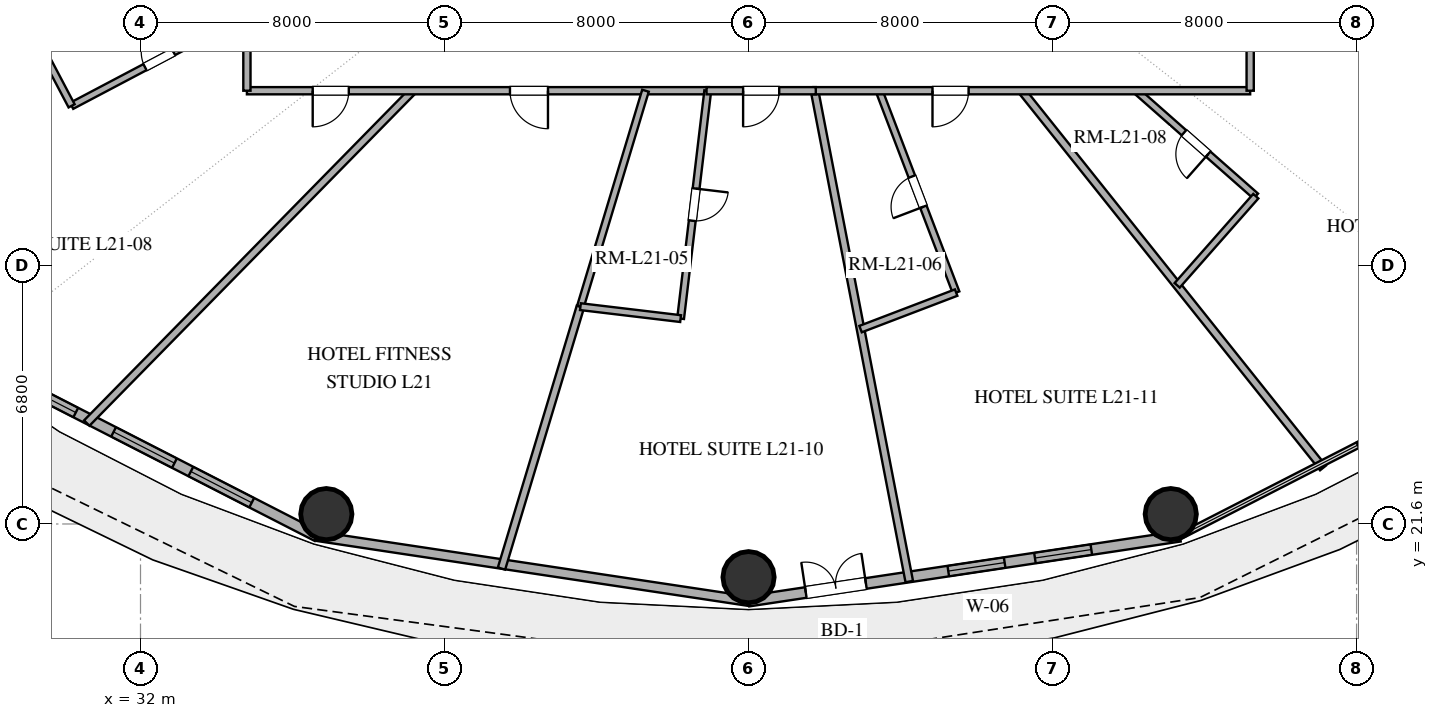
"""IFC4 building model, lengths in metres.
Left out: names, types, materials, properties, quantities, classifications, styles, units other than length and angle.
Written with IfcOpenShell. Run it as: python <this file> out.ifc"""

import sys

from ifc_helpers import new_model, si_unit, direction, frame, frame_2d, origin, origin_2d, place, context, subcontext, project, spatial, rectangle, hollow_circle, extrude, element, fill, save


model = new_model("IFC4")
c1 = context("Model", 3, precision=1e-05, world=origin(), true_north=direction((0.0, 1.0)))
c2 = subcontext(c1, "Body", "Model", "MODEL_VIEW")
j1 = project(units=[si_unit("LENGTHUNIT", "METRE"), si_unit("PLANEANGLEUNIT", "RADIAN")], contexts=[c1])
p1 = place(None, origin())
s1 = spatial("IfcSite", under=j1, at=p1, CompositionType="ELEMENT")
p2 = place(p1, origin())
s2 = spatial("IfcBuilding", under=s1, at=p2, CompositionType="ELEMENT")
p3 = place(p2, frame((0.0, 0.0, 87.6)))
s3 = spatial("IfcBuildingStorey", under=s2, at=p3, CompositionType="ELEMENT", Elevation=87.6)
for number, where, z_axis, x_axis in (
    (1, (36.89, 21.859, 0.0), (0.0, 0.0, 1.0), (1.0, 0.0, 0.0)),
    (2, (48.0, 20.2, 0.0), (0.0, 0.0, 1.0), (1.0, 0.0, 0.0)),
    (3, (59.11, 21.859, 0.0), (0.0, 0.0, 1.0), (1.0, 0.0, 0.0)),
):
    element("IfcColumn", number, at=place(p3, frame(where, z_axis=z_axis, x_axis=x_axis)), inside=s3, PredefinedType="COLUMN", context=c2, shape_type="SweptSolid", body=[
        extrude(hollow_circle(Radius=0.675, WallThickness=0.036, at=origin_2d()), origin(), (0.0, 0.0, 1.0), 3.38),
    ])
p4 = place(p3, frame((27.16, 26.14, 0.0), z_axis=(0.0, 0.0, 1.0), x_axis=(0.889959505023, -0.45603955905, 0.0)))
e4 = element("IfcWall", 4, at=p4, inside=s3, PredefinedType="SOLIDWALL", context=c2, shape_type="SweptSolid", body=[
    extrude(rectangle(XDim=10.662, YDim=0.28, at=frame_2d((5.331, 0.0))), origin(), (0.0, 0.0, 1.0), 3.38),
])
p5 = place(p4, frame((1.724, 0.0, 0.85)))
e5 = element("IfcOpeningElement", 5, at=p5, cuts=e4, PredefinedType="OPENING", context=c2, shape_type="SweptSolid", body=[
    extrude(rectangle(XDim=1.8, YDim=2.2, at=frame_2d((0.9, 1.1))), frame((0.0, 0.15, 0.0), z_axis=(0.0, -1.0, 0.0), x_axis=(1.0, 0.0, 0.0)), (0.0, 0.0, 1.0), 0.3),
])
p6 = place(p4, frame((4.642, 0.0, 0.85)))
e6 = element("IfcOpeningElement", 6, at=p6, cuts=e4, PredefinedType="OPENING", context=c2, shape_type="SweptSolid", body=[
    extrude(rectangle(XDim=1.8, YDim=2.2, at=frame_2d((0.9, 1.1))), frame((0.0, 0.15, 0.0), z_axis=(0.0, -1.0, 0.0), x_axis=(1.0, 0.0, 0.0)), (0.0, 0.0, 1.0), 0.3),
])
p7 = place(p4, frame((6.927, 0.0, 0.85)))
e7 = element("IfcOpeningElement", 7, at=p7, cuts=e4, PredefinedType="OPENING", context=c2, shape_type="SweptSolid", body=[
    extrude(rectangle(XDim=1.8, YDim=2.2, at=frame_2d((0.9, 1.1))), frame((0.0, 0.15, 0.0), z_axis=(0.0, -1.0, 0.0), x_axis=(1.0, 0.0, 0.0)), (0.0, 0.0, 1.0), 0.3),
])
p8 = place(p3, frame((36.649, 21.277, 0.0), z_axis=(0.0, 0.0, 1.0), x_axis=(0.988877774656, -0.148730450117, 0.0)))
e8 = element("IfcWall", 8, at=p8, inside=s3, PredefinedType="SOLIDWALL", context=c2, shape_type="SweptSolid", body=[
    extrude(rectangle(XDim=11.479, YDim=0.25, at=frame_2d((5.74, 0.0))), origin(), (0.0, 0.0, 1.0), 3.38),
])
p9 = place(p3, frame((48.0, 19.57, 0.0), z_axis=(0.0, 0.0, 1.0), x_axis=(0.988877774656, 0.148730450117, 0.0)))
e9 = element("IfcWall", 9, at=p9, inside=s3, PredefinedType="SOLIDWALL", context=c2, shape_type="SweptSolid", body=[
    extrude(rectangle(XDim=11.479, YDim=0.28, at=frame_2d((5.74, 0.0))), origin(), (0.0, 0.0, 1.0), 3.38),
])
p10 = place(p9, frame((1.524, 0.0, 0.0)))
e10 = element("IfcOpeningElement", 10, at=p10, cuts=e9, PredefinedType="OPENING", context=c2, shape_type="SweptSolid", body=[
    extrude(rectangle(XDim=1.6, YDim=2.25, at=frame_2d((0.8, 1.125))), frame((0.0, 0.15, 0.0), z_axis=(0.0, -1.0, 0.0), x_axis=(1.0, 0.0, 0.0)), (0.0, 0.0, 1.0), 0.3),
])
p11 = place(p9, frame((5.315, 0.0, 0.85)))
e11 = element("IfcOpeningElement", 11, at=p11, cuts=e9, PredefinedType="OPENING", context=c2, shape_type="SweptSolid", body=[
    extrude(rectangle(XDim=1.5, YDim=2.0, at=frame_2d((0.75, 1.0))), frame((0.0, 0.15, 0.0), z_axis=(0.0, -1.0, 0.0), x_axis=(1.0, 0.0, 0.0)), (0.0, 0.0, 1.0), 0.3),
])
p12 = place(p9, frame((7.621, 0.0, 0.85)))
e12 = element("IfcOpeningElement", 12, at=p12, cuts=e9, PredefinedType="OPENING", context=c2, shape_type="SweptSolid", body=[
    extrude(rectangle(XDim=1.5, YDim=2.0, at=frame_2d((0.75, 1.0))), frame((0.0, 0.15, 0.0), z_axis=(0.0, -1.0, 0.0), x_axis=(1.0, 0.0, 0.0)), (0.0, 0.0, 1.0), 0.3),
])
p13 = place(p3, frame((39.167, 33.0, 0.0), z_axis=(0.0, 0.0, 1.0), x_axis=(-0.700440086719, -0.713711205542, 0.0)))
e13 = element("IfcWall", 13, at=p13, inside=s3, PredefinedType="PARTITIONING", context=c2, shape_type="SweptSolid", body=[
    extrude(rectangle(XDim=12.252, YDim=0.2, at=frame_2d((6.126, 0.0))), origin(), (0.0, 0.0, 1.0), 2.74),
])
p14 = place(p3, frame((34.8, 37.75, 0.0), z_axis=(0.0, 0.0, 1.0), x_axis=(-0.951880556228, -0.306469258939, 0.0)))
e14 = element("IfcWall", 14, at=p14, inside=s3, PredefinedType="PARTITIONING", context=c2, shape_type="SweptSolid", body=[
    extrude(rectangle(XDim=14.428, YDim=0.2, at=frame_2d((7.214, 0.0))), origin(), (0.0, 0.0, 1.0), 2.74),
])
p15 = place(p3, frame((41.5, 20.427, 0.0), z_axis=(0.0, 0.0, 1.0), x_axis=(0.288514746458, 0.957475451944, 0.0)))
e15 = element("IfcWall", 15, at=p15, inside=s3, PredefinedType="PARTITIONING", context=c2, shape_type="SweptSolid", body=[
    extrude(rectangle(XDim=7.197, YDim=0.2, at=frame_2d((3.599, 0.0))), origin(), (0.0, 0.0, 1.0), 2.74),
])
p16 = place(p3, frame((49.737, 33.0, 0.0), z_axis=(0.0, 0.0, 1.0), x_axis=(0.18949034594, -0.981882584017, 0.0)))
e16 = element("IfcWall", 16, at=p16, inside=s3, PredefinedType="PARTITIONING", context=c2, shape_type="SweptSolid", body=[
    extrude(rectangle(XDim=13.153, YDim=0.2, at=frame_2d((6.577, 0.0))), origin(), (0.0, 0.0, 1.0), 2.74),
])
p17 = place(p3, frame((61.2, 36.208, 0.0), z_axis=(0.0, 0.0, 1.0), x_axis=(0.915722078144, -0.401812239235, 0.0)))
e17 = element("IfcWall", 17, at=p17, inside=s3, PredefinedType="PARTITIONING", context=c2, shape_type="SweptSolid", body=[
    extrude(rectangle(XDim=12.915, YDim=0.2, at=frame_2d((6.458, 0.0))), origin(), (0.0, 0.0, 1.0), 2.74),
])
p18 = place(p3, frame((55.189, 33.0, 0.0), z_axis=(0.0, 0.0, 1.0), x_axis=(0.624085468444, -0.781356082767, 0.0)))
e18 = element("IfcWall", 18, at=p18, inside=s3, PredefinedType="PARTITIONING", context=c2, shape_type="SweptSolid", body=[
    extrude(rectangle(XDim=12.703, YDim=0.2, at=frame_2d((6.352, 0.0))), origin(), (0.0, 0.0, 1.0), 2.74),
])
p19 = place(p3, frame((46.959, 33.0, 0.0), z_axis=(0.0, 0.0, 1.0), x_axis=(-1.0, 0.0, 0.0)))
e19 = element("IfcWall", 19, at=p19, inside=s3, PredefinedType="PARTITIONING", context=c2, shape_type="SweptSolid", body=[
    extrude(rectangle(XDim=12.159, YDim=0.19, at=frame_2d((6.08, 0.0))), origin(), (0.0, 0.0, 1.0), 2.74),
])
p20 = place(p19, frame((4.237, 0.0, 0.0)))
e20 = element("IfcOpeningElement", 20, at=p20, cuts=e19, PredefinedType="OPENING", context=c2, shape_type="SweptSolid", body=[
    extrude(rectangle(XDim=1.0, YDim=2.2, at=frame_2d((0.5, 1.1))), frame((0.0, 0.105, 0.0), z_axis=(0.0, -1.0, 0.0), x_axis=(1.0, 0.0, 0.0)), (0.0, 0.0, 1.0), 0.21),
])
p21 = place(p19, frame((9.478, 0.0, 0.0)))
e21 = element("IfcOpeningElement", 21, at=p21, cuts=e19, PredefinedType="OPENING", context=c2, shape_type="SweptSolid", body=[
    extrude(rectangle(XDim=0.95, YDim=2.15, at=frame_2d((0.475, 1.075))), frame((0.0, 0.105, 0.0), z_axis=(0.0, -1.0, 0.0), x_axis=(1.0, 0.0, 0.0)), (0.0, 0.0, 1.0), 0.21),
])
p22 = place(p3, frame((46.927, 33.0, 0.0), z_axis=(0.0, 0.0, 1.0), x_axis=(-0.118379942802, -0.99296837268, 0.0)))
e22 = element("IfcWall", 22, at=p22, inside=s3, PredefinedType="PLUMBINGWALL", context=c2, shape_type="SweptSolid", body=[
    extrude(rectangle(XDim=6.039, YDim=0.18, at=frame_2d((3.019, 0.0))), origin(), (0.0, 0.0, 1.0), 2.74),
])
p23 = place(p22, frame((2.594, 0.0, 0.0)))
e23 = element("IfcOpeningElement", 23, at=p23, cuts=e22, PredefinedType="OPENING", context=c2, shape_type="SweptSolid", body=[
    extrude(rectangle(XDim=0.85, YDim=2.1, at=frame_2d((0.425, 1.05))), frame((0.0, 0.1, 0.0), z_axis=(0.0, -1.0, 0.0), x_axis=(1.0, 0.0, 0.0)), (0.0, 0.0, 1.0), 0.2),
])
p24 = place(p3, frame((43.576, 27.318, 0.0), z_axis=(0.0, 0.0, 1.0), x_axis=(0.288532873685, 0.957469989505, 0.0)))
e24 = element("IfcWall", 24, at=p24, inside=s3, PredefinedType="PLUMBINGWALL", context=c2, shape_type="SweptSolid", body=[
    extrude(rectangle(XDim=5.934, YDim=0.18, at=frame_2d((2.967, 0.0))), origin(), (0.0, 0.0, 1.0), 2.74),
])
p25 = place(p3, frame((53.463, 27.688, 0.0), z_axis=(0.0, 0.0, 1.0), x_axis=(-0.356604128264, 0.934255583716, 0.0)))
e25 = element("IfcWall", 25, at=p25, inside=s3, PredefinedType="PLUMBINGWALL", context=c2, shape_type="SweptSolid", body=[
    extrude(rectangle(XDim=5.686, YDim=0.18, at=frame_2d((2.843, 0.0))), origin(), (0.0, 0.0, 1.0), 2.74),
])
p26 = place(p25, frame((2.418, 0.0, 0.0)))
e26 = element("IfcOpeningElement", 26, at=p26, cuts=e25, PredefinedType="OPENING", context=c2, shape_type="SweptSolid", body=[
    extrude(rectangle(XDim=0.85, YDim=2.1, at=frame_2d((0.425, 1.05))), frame((0.0, 0.1, 0.0), z_axis=(0.0, -1.0, 0.0), x_axis=(1.0, 0.0, 0.0)), (0.0, 0.0, 1.0), 0.2),
])
p27 = place(p3, frame((30.187, 32.602, 0.0), z_axis=(0.0, 0.0, 1.0), x_axis=(0.884469007168, 0.466598944877, 0.0)))
e27 = element("IfcWall", 27, at=p27, inside=s3, PredefinedType="PLUMBINGWALL", context=c2, shape_type="SweptSolid", body=[
    extrude(rectangle(XDim=5.216, YDim=0.18, at=frame_2d((2.608, 0.0))), origin(), (0.0, 0.0, 1.0), 2.74),
])
p28 = place(p27, frame((2.183, 0.0, 0.0)))
e28 = element("IfcOpeningElement", 28, at=p28, cuts=e27, PredefinedType="OPENING", context=c2, shape_type="SweptSolid", body=[
    extrude(rectangle(XDim=0.85, YDim=2.1, at=frame_2d((0.425, 1.05))), frame((0.0, 0.1, 0.0), z_axis=(0.0, -1.0, 0.0), x_axis=(1.0, 0.0, 0.0)), (0.0, 0.0, 1.0), 0.2),
])
p29 = place(p3, frame((34.8, 33.0, 0.0), z_axis=(0.0, 0.0, 1.0), x_axis=(0.0, 1.0, 0.0)))
e29 = element("IfcWall", 29, at=p29, inside=s3, PredefinedType="PARTITIONING", context=c2, shape_type="SweptSolid", body=[
    extrude(rectangle(XDim=9.004, YDim=0.19, at=frame_2d((4.502, 0.0))), origin(), (0.0, 0.0, 1.0), 2.74),
])
p30 = place(p29, frame((6.385, 0.0, 0.0)))
e30 = element("IfcOpeningElement", 30, at=p30, cuts=e29, PredefinedType="OPENING", context=c2, shape_type="SweptSolid", body=[
    extrude(rectangle(XDim=0.95, YDim=2.15, at=frame_2d((0.475, 1.075))), frame((0.0, 0.105, 0.0), z_axis=(0.0, -1.0, 0.0), x_axis=(1.0, 0.0, 0.0)), (0.0, 0.0, 1.0), 0.21),
])
p31 = place(p3, frame((61.348, 30.225, 0.0), z_axis=(0.0, 0.0, 1.0), x_axis=(-0.749931272561, 0.661515749197, 0.0)))
e31 = element("IfcWall", 31, at=p31, inside=s3, PredefinedType="PLUMBINGWALL", context=c2, shape_type="SweptSolid", body=[
    extrude(rectangle(XDim=4.194, YDim=0.18, at=frame_2d((2.097, 0.0))), origin(), (0.0, 0.0, 1.0), 2.74),
])
p32 = place(p31, frame((1.672, 0.0, 0.0)))
e32 = element("IfcOpeningElement", 32, at=p32, cuts=e31, PredefinedType="OPENING", context=c2, shape_type="SweptSolid", body=[
    extrude(rectangle(XDim=0.85, YDim=2.1, at=frame_2d((0.425, 1.05))), frame((0.0, 0.1, 0.0), z_axis=(0.0, -1.0, 0.0), x_axis=(1.0, 0.0, 0.0)), (0.0, 0.0, 1.0), 0.2),
])
p33 = place(p3, frame((61.2, 33.0, 0.0), z_axis=(0.0, 0.0, 1.0), x_axis=(-1.0, 0.0, 0.0)))
e33 = element("IfcWall", 33, at=p33, inside=s3, PredefinedType="PARTITIONING", context=c2, shape_type="SweptSolid", body=[
    extrude(rectangle(XDim=11.496, YDim=0.19, at=frame_2d((5.748, 0.0))), origin(), (0.0, 0.0, 1.0), 2.74),
])
p34 = place(p33, frame((7.41, 0.0, 0.0)))
e34 = element("IfcOpeningElement", 34, at=p34, cuts=e33, PredefinedType="OPENING", context=c2, shape_type="SweptSolid", body=[
    extrude(rectangle(XDim=0.95, YDim=2.15, at=frame_2d((0.475, 1.075))), frame((0.0, 0.105, 0.0), z_axis=(0.0, -1.0, 0.0), x_axis=(1.0, 0.0, 0.0)), (0.0, 0.0, 1.0), 0.21),
])
p35 = place(p3, frame((28.535, 35.733, 0.0), z_axis=(0.0, 0.0, 1.0), x_axis=(0.466638742987, -0.884448010651, 0.0)))
e35 = element("IfcWall", 35, at=p35, inside=s3, PredefinedType="PLUMBINGWALL", context=c2, shape_type="SweptSolid", body=[
    extrude(rectangle(XDim=3.54, YDim=0.18, at=frame_2d((1.77, 0.0))), origin(), (0.0, 0.0, 1.0), 2.74),
])
p36 = place(p3, frame((61.2, 36.243, 0.0), z_axis=(0.0, 0.0, 1.0), x_axis=(0.0, -1.0, 0.0)))
e36 = element("IfcWall", 36, at=p36, inside=s3, PredefinedType="PARTITIONING", context=c2, shape_type="SweptSolid", body=[
    extrude(rectangle(XDim=3.243, YDim=0.19, at=frame_2d((1.621, 0.0))), origin(), (0.0, 0.0, 1.0), 2.74),
])
p37 = place(p36, frame((1.146, 0.0, 0.0)))
e37 = element("IfcOpeningElement", 37, at=p37, cuts=e36, PredefinedType="OPENING", context=c2, shape_type="SweptSolid", body=[
    extrude(rectangle(XDim=0.95, YDim=2.15, at=frame_2d((0.475, 1.075))), frame((0.0, 0.105, 0.0), z_axis=(0.0, -1.0, 0.0), x_axis=(1.0, 0.0, 0.0)), (0.0, 0.0, 1.0), 0.21),
])
p38 = place(p3, frame((59.279, 27.879, 0.0), z_axis=(0.0, 0.0, 1.0), x_axis=(0.661515810511, 0.749931218475, 0.0)))
e38 = element("IfcWall", 38, at=p38, inside=s3, PredefinedType="PLUMBINGWALL", context=c2, shape_type="SweptSolid", body=[
    extrude(rectangle(XDim=3.129, YDim=0.18, at=frame_2d((1.564, 0.0))), origin(), (0.0, 0.0, 1.0), 2.74),
])
p39 = place(p3, frame((49.77, 33.0, 0.0), z_axis=(0.0, 0.0, 1.0), x_axis=(-1.0, 0.0, 0.0)))
e39 = element("IfcWall", 39, at=p39, inside=s3, PredefinedType="PARTITIONING", context=c2, shape_type="SweptSolid", body=[
    extrude(rectangle(XDim=2.875, YDim=0.19, at=frame_2d((1.438, 0.0))), origin(), (0.0, 0.0, 1.0), 2.74),
])
p40 = place(p39, frame((0.962, 0.0, 0.0)))
e40 = element("IfcOpeningElement", 40, at=p40, cuts=e39, PredefinedType="OPENING", context=c2, shape_type="SweptSolid", body=[
    extrude(rectangle(XDim=0.95, YDim=2.15, at=frame_2d((0.475, 1.075))), frame((0.0, 0.105, 0.0), z_axis=(0.0, -1.0, 0.0), x_axis=(1.0, 0.0, 0.0)), (0.0, 0.0, 1.0), 0.21),
])
p41 = place(p3, frame((50.948, 26.728, 0.0), z_axis=(0.0, 0.0, 1.0), x_axis=(0.934244754769, 0.35663249738, 0.0)))
e41 = element("IfcWall", 41, at=p41, inside=s3, PredefinedType="PLUMBINGWALL", context=c2, shape_type="SweptSolid", body=[
    extrude(rectangle(XDim=2.692, YDim=0.18, at=frame_2d((1.346, 0.0))), origin(), (0.0, 0.0, 1.0), 2.74),
])
p42 = place(p3, frame((46.212, 27.004, 0.0), z_axis=(0.0, 0.0, 1.0), x_axis=(-0.992959714657, 0.118452543529, 0.0)))
e42 = element("IfcWall", 42, at=p42, inside=s3, PredefinedType="PLUMBINGWALL", context=c2, shape_type="SweptSolid", body=[
    extrude(rectangle(XDim=2.655, YDim=0.18, at=frame_2d((1.327, 0.0))), origin(), (0.0, 0.0, 1.0), 2.74),
])
p43 = place(p5, origin())
e43 = element("IfcWindow", 43, at=p43, inside=s3, PartitioningType="SINGLE_PANEL", PredefinedType="WINDOW", context=c2, shape_type="SweptSolid", body=[
    extrude(rectangle(XDim=1.8, YDim=2.2, at=frame_2d((0.9, 1.1))), frame((0.0, 0.03, 0.0), z_axis=(0.0, -1.0, 0.0), x_axis=(1.0, 0.0, 0.0)), (0.0, 0.0, 1.0), 0.06),
])
fill(e5, e43)
p44 = place(p6, origin())
e44 = element("IfcWindow", 44, at=p44, inside=s3, PartitioningType="SINGLE_PANEL", PredefinedType="WINDOW", context=c2, shape_type="SweptSolid", body=[
    extrude(rectangle(XDim=1.8, YDim=2.2, at=frame_2d((0.9, 1.1))), frame((0.0, 0.03, 0.0), z_axis=(0.0, -1.0, 0.0), x_axis=(1.0, 0.0, 0.0)), (0.0, 0.0, 1.0), 0.06),
])
fill(e6, e44)
p45 = place(p7, origin())
e45 = element("IfcWindow", 45, at=p45, inside=s3, PartitioningType="SINGLE_PANEL", PredefinedType="WINDOW", context=c2, shape_type="SweptSolid", body=[
    extrude(rectangle(XDim=1.8, YDim=2.2, at=frame_2d((0.9, 1.1))), frame((0.0, 0.03, 0.0), z_axis=(0.0, -1.0, 0.0), x_axis=(1.0, 0.0, 0.0)), (0.0, 0.0, 1.0), 0.06),
])
fill(e7, e45)
p46 = place(p10, origin())
e46 = element("IfcDoor", 46, at=p46, inside=s3, OperationType="DOUBLE_DOOR_SINGLE_SWING", PredefinedType="DOOR", context=c2, shape_type="SweptSolid", body=[
    extrude(rectangle(XDim=1.6, YDim=2.25, at=frame_2d((0.8, 1.125))), frame((0.0, 0.025, 0.0), z_axis=(0.0, -1.0, 0.0), x_axis=(1.0, 0.0, 0.0)), (0.0, 0.0, 1.0), 0.05),
])
fill(e10, e46)
p47 = place(p11, origin())
e47 = element("IfcWindow", 47, at=p47, inside=s3, PartitioningType="SINGLE_PANEL", PredefinedType="WINDOW", context=c2, shape_type="SweptSolid", body=[
    extrude(rectangle(XDim=1.5, YDim=2.0, at=frame_2d((0.75, 1.0))), frame((0.0, 0.03, 0.0), z_axis=(0.0, -1.0, 0.0), x_axis=(1.0, 0.0, 0.0)), (0.0, 0.0, 1.0), 0.06),
])
fill(e11, e47)
p48 = place(p12, origin())
e48 = element("IfcWindow", 48, at=p48, inside=s3, PartitioningType="SINGLE_PANEL", PredefinedType="WINDOW", context=c2, shape_type="SweptSolid", body=[
    extrude(rectangle(XDim=1.5, YDim=2.0, at=frame_2d((0.75, 1.0))), frame((0.0, 0.03, 0.0), z_axis=(0.0, -1.0, 0.0), x_axis=(1.0, 0.0, 0.0)), (0.0, 0.0, 1.0), 0.06),
])
fill(e12, e48)
p49 = place(p20, origin())
e49 = element("IfcDoor", 49, at=p49, inside=s3, OperationType="SINGLE_SWING_LEFT", PredefinedType="DOOR", context=c2, shape_type="SweptSolid", body=[
    extrude(rectangle(XDim=1.0, YDim=2.2, at=frame_2d((0.5, 1.1))), frame((0.0, 0.025, 0.0), z_axis=(0.0, -1.0, 0.0), x_axis=(1.0, 0.0, 0.0)), (0.0, 0.0, 1.0), 0.05),
])
fill(e20, e49)
p50 = place(p21, origin())
e50 = element("IfcDoor", 50, at=p50, inside=s3, OperationType="SINGLE_SWING_RIGHT", PredefinedType="DOOR", context=c2, shape_type="SweptSolid", body=[
    extrude(rectangle(XDim=0.95, YDim=2.15, at=frame_2d((0.475, 1.075))), frame((0.0, 0.025, 0.0), z_axis=(0.0, -1.0, 0.0), x_axis=(1.0, 0.0, 0.0)), (0.0, 0.0, 1.0), 0.05),
])
fill(e21, e50)
p51 = place(p23, origin())
e51 = element("IfcDoor", 51, at=p51, inside=s3, OperationType="SINGLE_SWING_LEFT", PredefinedType="DOOR", context=c2, shape_type="SweptSolid", body=[
    extrude(rectangle(XDim=0.85, YDim=2.1, at=frame_2d((0.425, 1.05))), frame((0.0, 0.025, 0.0), z_axis=(0.0, -1.0, 0.0), x_axis=(1.0, 0.0, 0.0)), (0.0, 0.0, 1.0), 0.05),
])
fill(e23, e51)
p52 = place(p26, origin())
e52 = element("IfcDoor", 52, at=p52, inside=s3, OperationType="SINGLE_SWING_LEFT", PredefinedType="DOOR", context=c2, shape_type="SweptSolid", body=[
    extrude(rectangle(XDim=0.85, YDim=2.1, at=frame_2d((0.425, 1.05))), frame((0.0, 0.025, 0.0), z_axis=(0.0, -1.0, 0.0), x_axis=(1.0, 0.0, 0.0)), (0.0, 0.0, 1.0), 0.05),
])
fill(e26, e52)
p53 = place(p28, origin())
e53 = element("IfcDoor", 53, at=p53, inside=s3, OperationType="SINGLE_SWING_RIGHT", PredefinedType="DOOR", context=c2, shape_type="SweptSolid", body=[
    extrude(rectangle(XDim=0.85, YDim=2.1, at=frame_2d((0.425, 1.05))), frame((0.0, 0.025, 0.0), z_axis=(0.0, -1.0, 0.0), x_axis=(1.0, 0.0, 0.0)), (0.0, 0.0, 1.0), 0.05),
])
fill(e28, e53)
p54 = place(p32, origin())
e54 = element("IfcDoor", 54, at=p54, inside=s3, OperationType="SINGLE_SWING_LEFT", PredefinedType="DOOR", context=c2, shape_type="SweptSolid", body=[
    extrude(rectangle(XDim=0.85, YDim=2.1, at=frame_2d((0.425, 1.05))), frame((0.0, 0.025, 0.0), z_axis=(0.0, -1.0, 0.0), x_axis=(1.0, 0.0, 0.0)), (0.0, 0.0, 1.0), 0.05),
])
fill(e32, e54)
p55 = place(p34, origin())
e55 = element("IfcDoor", 55, at=p55, inside=s3, OperationType="SINGLE_SWING_RIGHT", PredefinedType="DOOR", context=c2, shape_type="SweptSolid", body=[
    extrude(rectangle(XDim=0.95, YDim=2.15, at=frame_2d((0.475, 1.075))), frame((0.0, 0.025, 0.0), z_axis=(0.0, -1.0, 0.0), x_axis=(1.0, 0.0, 0.0)), (0.0, 0.0, 1.0), 0.05),
])
fill(e34, e55)
p56 = place(p40, origin())
e56 = element("IfcDoor", 56, at=p56, inside=s3, OperationType="SINGLE_SWING_RIGHT", PredefinedType="DOOR", context=c2, shape_type="SweptSolid", body=[
    extrude(rectangle(XDim=0.95, YDim=2.15, at=frame_2d((0.475, 1.075))), frame((0.0, 0.025, 0.0), z_axis=(0.0, -1.0, 0.0), x_axis=(1.0, 0.0, 0.0)), (0.0, 0.0, 1.0), 0.05),
])
fill(e40, e56)
save(model, sys.argv[1])
